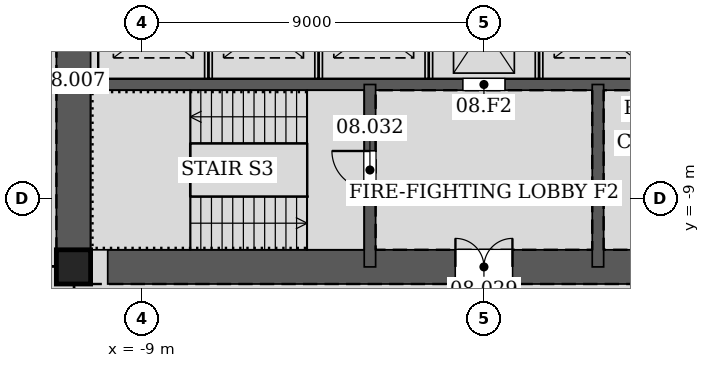
"""IFC4 building model, lengths in metres.
Left out: names, types, materials, properties, quantities, classifications, styles, units other than length and angle.
Written with IfcOpenShell. Run it as: python <this file> out.ifc"""

import sys

from ifc_helpers import new_model, si_unit, direction, frame, frame_2d, origin, origin_2d, place, context, subcontext, project, spatial, rectangle, hollow_rectangle, extrude, element, fill, save


model = new_model("IFC4")
c1 = context("Model", 3, precision=1e-05, world=origin(), true_north=direction((0.0, 1.0)))
c2 = subcontext(c1, "Body", "Model", "MODEL_VIEW")
j1 = project(units=[si_unit("LENGTHUNIT", "METRE"), si_unit("PLANEANGLEUNIT", "RADIAN")], contexts=[c1])
p1 = place(None, origin())
s1 = spatial("IfcSite", under=j1, at=p1, CompositionType="ELEMENT")
p2 = place(p1, origin())
s2 = spatial("IfcBuilding", under=s1, at=p2, CompositionType="ELEMENT")
p3 = place(p2, frame((0.0, 0.0, 41.4)))
s3 = spatial("IfcBuildingStorey", under=s2, at=p3, CompositionType="ELEMENT", Elevation=41.4)
p4 = place(p3, frame((-10.8, -10.8, 0.0), z_axis=(0.0, 0.0, 1.0), x_axis=(1.0, 0.0, 0.0)))
e1 = element("IfcColumn", 1, at=p4, inside=s3, PredefinedType="COLUMN", context=c2, shape_type="SweptSolid", body=[
    extrude(hollow_rectangle(XDim=0.9, YDim=0.9, WallThickness=0.06, at=origin_2d()), origin(), (0.0, 0.0, 1.0), 4.2),
])
p5 = place(p3, frame((-10.8, -10.8, 0.0), z_axis=(0.0, 0.0, 1.0), x_axis=(1.0, 0.0, 0.0)))
e2 = element("IfcWall", 2, at=p5, inside=s3, PredefinedType="SOLIDWALL", context=c2, shape_type="SweptSolid", body=[
    extrude(rectangle(XDim=21.6, YDim=0.9, at=frame_2d((10.8, 0.0))), origin(), (0.0, 0.0, 1.0), 4.2),
])
p6 = place(p5, frame((10.05, 0.0, 0.0)))
e3 = element("IfcOpeningElement", 3, at=p6, cuts=e2, PredefinedType="OPENING", context=c2, shape_type="SweptSolid", body=[
    extrude(rectangle(XDim=1.5, YDim=2.1, at=frame_2d((0.75, 1.05))), frame((0.0, 0.46, 0.0), z_axis=(0.0, -1.0, 0.0), x_axis=(1.0, 0.0, 0.0)), (0.0, 0.0, 1.0), 0.92),
])
p7 = place(p5, frame((17.1, 0.0, 0.0)))
e4 = element("IfcOpeningElement", 4, at=p7, cuts=e2, PredefinedType="OPENING", context=c2, shape_type="SweptSolid", body=[
    extrude(rectangle(XDim=0.9, YDim=2.1, at=frame_2d((0.45, 1.05))), frame((0.0, 0.46, 0.0), z_axis=(0.0, -1.0, 0.0), x_axis=(1.0, 0.0, 0.0)), (0.0, 0.0, 1.0), 0.92),
])
p8 = place(p3, frame((-10.8, 10.8, 0.0), z_axis=(0.0, 0.0, 1.0), x_axis=(0.0, -1.0, 0.0)))
e5 = element("IfcWall", 5, at=p8, inside=s3, PredefinedType="SOLIDWALL", context=c2, shape_type="SweptSolid", body=[
    extrude(rectangle(XDim=21.6, YDim=0.9, at=frame_2d((10.8, 0.0))), origin(), (0.0, 0.0, 1.0), 4.2),
])
p9 = place(p8, frame((8.7, 0.0, 0.0)))
e6 = element("IfcOpeningElement", 6, at=p9, cuts=e5, PredefinedType="OPENING", context=c2, shape_type="SweptSolid", body=[
    extrude(rectangle(XDim=1.2, YDim=2.1, at=frame_2d((0.6, 1.05))), frame((0.0, 0.46, 0.0), z_axis=(0.0, -1.0, 0.0), x_axis=(1.0, 0.0, 0.0)), (0.0, 0.0, 1.0), 0.92),
])
p10 = place(p8, frame((11.7, 0.0, 0.0)))
e7 = element("IfcOpeningElement", 7, at=p10, cuts=e5, PredefinedType="OPENING", context=c2, shape_type="SweptSolid", body=[
    extrude(rectangle(XDim=1.2, YDim=2.1, at=frame_2d((0.6, 1.05))), frame((0.0, 0.46, 0.0), z_axis=(0.0, -1.0, 0.0), x_axis=(1.0, 0.0, 0.0)), (0.0, 0.0, 1.0), 0.92),
])
p11 = place(p3, frame((-10.8, -6.0, 0.0), z_axis=(0.0, 0.0, 1.0), x_axis=(1.0, 0.0, 0.0)))
e8 = element("IfcWall", 8, at=p11, inside=s3, PredefinedType="SOLIDWALL", context=c2, shape_type="SweptSolid", body=[
    extrude(rectangle(XDim=21.6, YDim=0.3, at=frame_2d((10.8, 0.0))), origin(), (0.0, 0.0, 1.0), 4.2),
])
p12 = place(p11, frame((10.25, 0.0, 0.0)))
e9 = element("IfcOpeningElement", 9, at=p12, cuts=e8, PredefinedType="OPENING", context=c2, shape_type="SweptSolid", body=[
    extrude(rectangle(XDim=1.1, YDim=2.1, at=frame_2d((0.55, 1.05))), frame((0.0, 0.16, 0.0), z_axis=(0.0, -1.0, 0.0), x_axis=(1.0, 0.0, 0.0)), (0.0, 0.0, 1.0), 0.32),
])
p13 = place(p3, frame((-3.0, -6.0, 0.0), z_axis=(0.0, 0.0, 1.0), x_axis=(0.0, -1.0, 0.0)))
e10 = element("IfcWall", 10, at=p13, inside=s3, PredefinedType="SOLIDWALL", context=c2, shape_type="SweptSolid", body=[
    extrude(rectangle(XDim=4.8, YDim=0.3, at=frame_2d((2.4, 0.0))), origin(), (0.0, 0.0, 1.0), 4.2),
])
p14 = place(p13, frame((1.75, 0.0, 0.0)))
e11 = element("IfcOpeningElement", 11, at=p14, cuts=e10, PredefinedType="OPENING", context=c2, shape_type="SweptSolid", body=[
    extrude(rectangle(XDim=1.0, YDim=2.1, at=frame_2d((0.5, 1.05))), frame((0.0, 0.16, 0.0), z_axis=(0.0, -1.0, 0.0), x_axis=(1.0, 0.0, 0.0)), (0.0, 0.0, 1.0), 0.32),
])
p15 = place(p3, frame((3.0, -6.0, 0.0), z_axis=(0.0, 0.0, 1.0), x_axis=(0.0, -1.0, 0.0)))
e12 = element("IfcWall", 12, at=p15, inside=s3, PredefinedType="SOLIDWALL", context=c2, shape_type="SweptSolid", body=[
    extrude(rectangle(XDim=4.8, YDim=0.3, at=frame_2d((2.4, 0.0))), origin(), (0.0, 0.0, 1.0), 4.2),
])
for number, where, z_axis, x_axis in (
    (13, (-7.25, -5.85, 0.0), (0.0, 0.0, 1.0), (0.0, 1.0, 0.0)),
    (14, (-4.35, -5.85, 0.0), (0.0, 0.0, 1.0), (0.0, 1.0, 0.0)),
    (15, (-1.45, -5.85, 0.0), (0.0, 0.0, 1.0), (0.0, 1.0, 0.0)),
    (16, (1.45, -5.85, 0.0), (0.0, 0.0, 1.0), (0.0, 1.0, 0.0)),
):
    element("IfcWall", number, at=place(p3, frame(where, z_axis=z_axis, x_axis=x_axis)), inside=s3, PredefinedType="PARTITIONING", context=c2, shape_type="SweptSolid", body=[
        extrude(rectangle(XDim=2.7, YDim=0.2, at=frame_2d((1.35, 0.0))), origin(), (0.0, 0.0, 1.0), 4.2),
    ])
p16 = place(p6, origin())
e17 = element("IfcDoor", 17, at=p16, inside=s3, OperationType="DOUBLE_DOOR_SINGLE_SWING", PredefinedType="DOOR", context=c2, shape_type="SweptSolid", body=[
    extrude(rectangle(XDim=1.5, YDim=2.1, at=frame_2d((0.75, 1.05))), frame((0.0, 0.025, 0.0), z_axis=(0.0, -1.0, 0.0), x_axis=(1.0, 0.0, 0.0)), (0.0, 0.0, 1.0), 0.05),
])
fill(e3, e17)
p17 = place(p14, frame((1.0, 0.0, 0.0), z_axis=(0.0, 0.0, 1.0), x_axis=(-1.0, 0.0, 0.0)))
e18 = element("IfcDoor", 18, at=p17, inside=s3, OperationType="SINGLE_SWING_RIGHT", PredefinedType="DOOR", context=c2, shape_type="SweptSolid", body=[
    extrude(rectangle(XDim=1.0, YDim=2.1, at=frame_2d((0.5, 1.05))), frame((0.0, 0.025, 0.0), z_axis=(0.0, -1.0, 0.0), x_axis=(1.0, 0.0, 0.0)), (0.0, 0.0, 1.0), 0.05),
])
fill(e11, e18)
p18 = place(p12, origin())
e19 = element("IfcDoor", 19, at=p18, inside=s3, OperationType="DOUBLE_DOOR_SLIDING", PredefinedType="DOOR", context=c2, shape_type="SweptSolid", body=[
    extrude(rectangle(XDim=1.1, YDim=2.1, at=frame_2d((0.55, 1.05))), frame((0.0, 0.025, 0.0), z_axis=(0.0, -1.0, 0.0), x_axis=(1.0, 0.0, 0.0)), (0.0, 0.0, 1.0), 0.05),
])
fill(e9, e19)
save(model, sys.argv[1])
